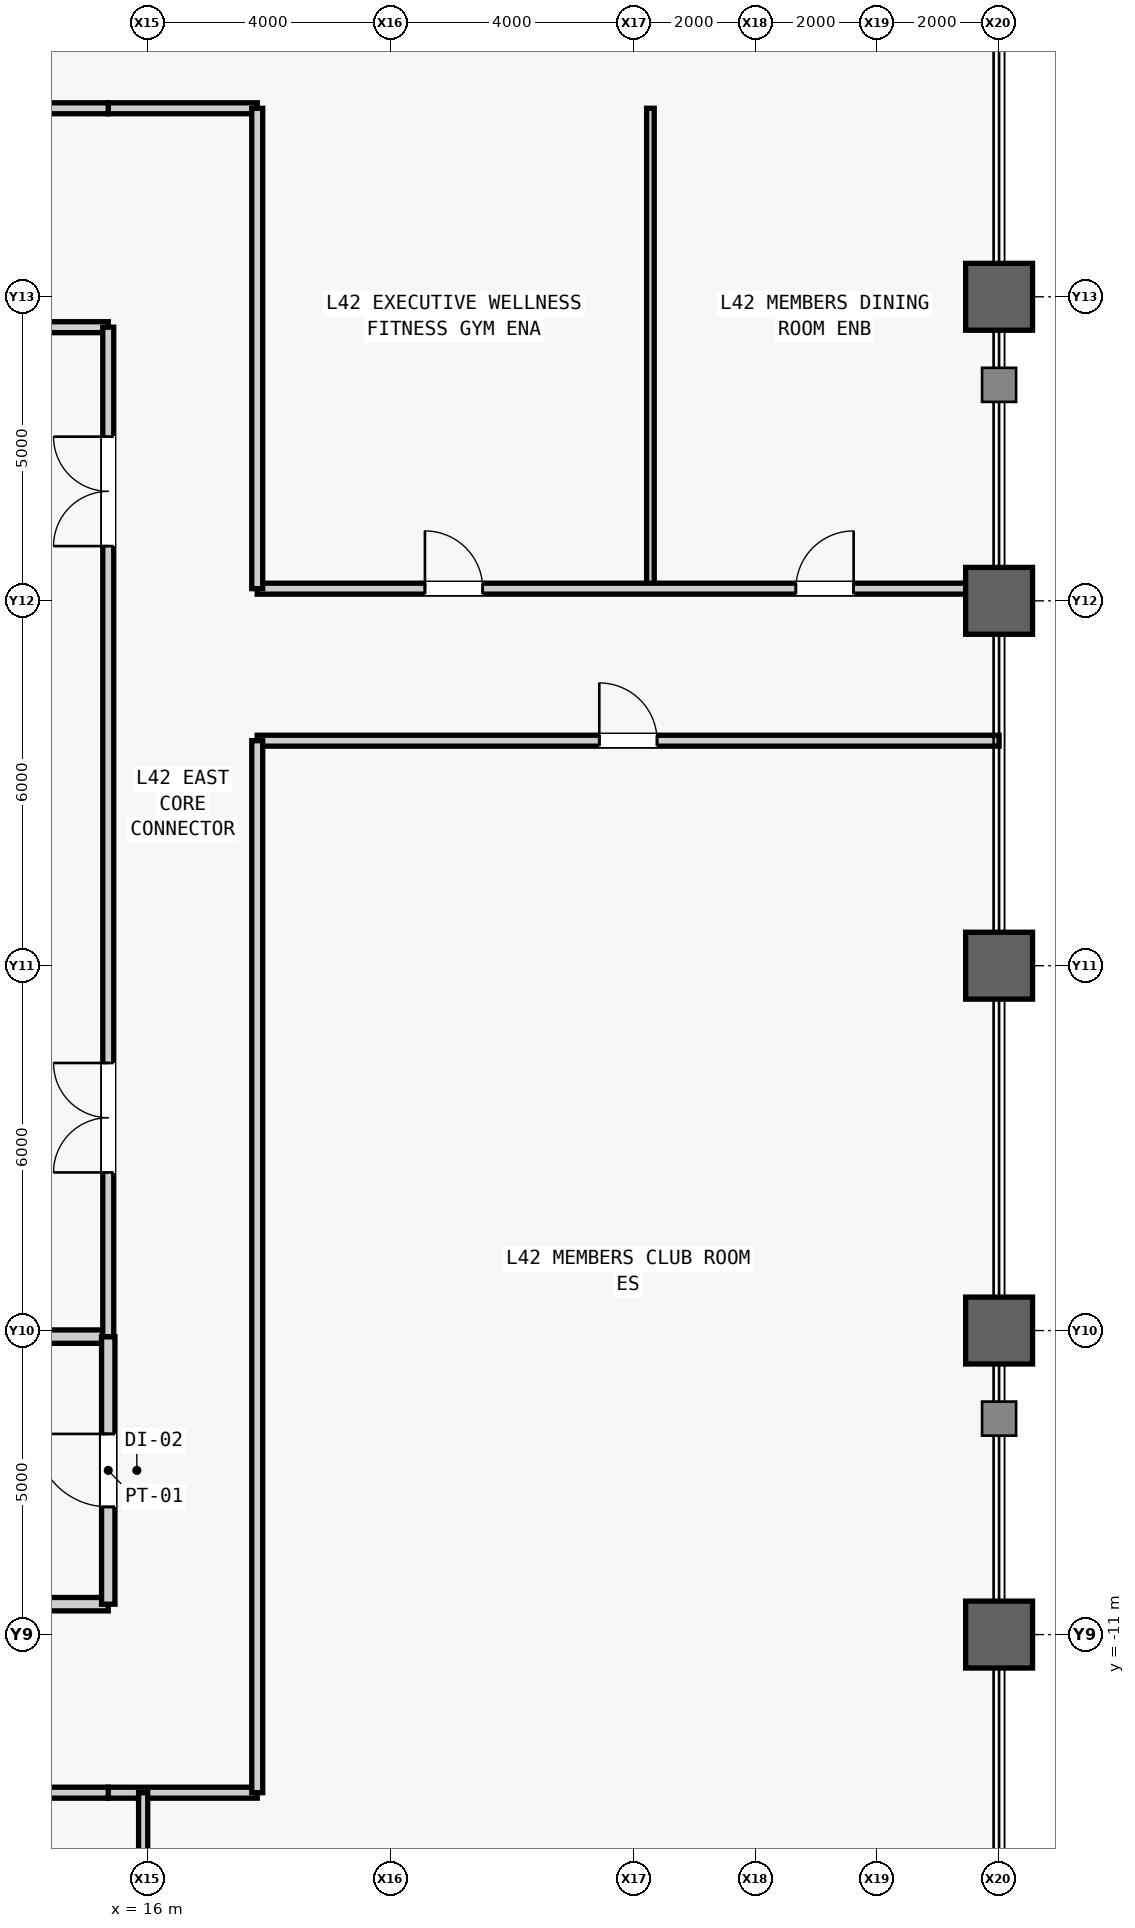
"""IFC4 building model, lengths in metres.
Left out: names, types, materials, properties, quantities, classifications, styles, units other than length and angle.
Written with IfcOpenShell. Run it as: python <this file> out.ifc"""

import sys

from ifc_helpers import new_model, si_unit, direction, frame, frame_2d, origin, origin_2d, place, context, subcontext, project, spatial, rectangle, hollow_rectangle, extrude, source, transform, mapped, element, fill, save


model = new_model("IFC4")
c1 = context("Model", 3, precision=1e-05, world=origin(), true_north=direction((0.0, 1.0)))
c2 = subcontext(c1, "Body", "Model", "MODEL_VIEW")
j1 = project(units=[si_unit("LENGTHUNIT", "METRE"), si_unit("PLANEANGLEUNIT", "RADIAN")], contexts=[c1])
p1 = place(None, origin())
s1 = spatial("IfcSite", under=j1, at=p1, CompositionType="ELEMENT")
p2 = place(p1, origin())
s2 = spatial("IfcBuilding", under=s1, at=p2, CompositionType="ELEMENT")
p3 = place(p2, frame((0.0, 0.0, 183.1)))
s3 = spatial("IfcBuildingStorey", under=s2, at=p3, CompositionType="ELEMENT", Elevation=183.1)
m1 = source(origin(), c2, "Body", "SweptSolid", [
    extrude(hollow_rectangle(XDim=1.1, YDim=1.1, WallThickness=0.06, at=origin_2d()), origin(), (0.0, 0.0, 1.0), 4.0),
])
for number, where, z_axis, x_axis in (
    (1, (30.0, -11.0, 0.0), (0.0, 0.0, 1.0), (1.0, 0.0, 0.0)),
    (2, (30.0, -6.0, 0.0), (0.0, 0.0, 1.0), (1.0, 0.0, 0.0)),
    (3, (30.0, 0.0, 0.0), (0.0, 0.0, 1.0), (1.0, 0.0, 0.0)),
    (4, (30.0, 6.0, 0.0), (0.0, 0.0, 1.0), (1.0, 0.0, 0.0)),
    (5, (30.0, 11.0, 0.0), (0.0, 0.0, 1.0), (1.0, 0.0, 0.0)),
):
    element("IfcColumn", number, at=place(p3, frame(where, z_axis=z_axis, x_axis=x_axis)), inside=s3, PredefinedType="COLUMN", context=c2, shape_type="MappedRepresentation", body=[
        mapped(m1, transform((0.0, 0.0, 0.0), scale=1.0)),
    ])
m2 = source(origin(), c2, "Body", "SweptSolid", [
    extrude(rectangle(XDim=4.05, YDim=0.22, at=frame_2d((2.025, 0.0))), origin(), (0.0, 0.0, 1.0), 3.78),
])
p4 = place(p3, frame((11.3, -10.5, 0.0), z_axis=(0.0, 0.0, 1.0), x_axis=(1.0, 0.0, 0.0)))
e6 = element("IfcWall", 6, at=p4, inside=s3, PredefinedType="PARTITIONING", context=c2, shape_type="MappedRepresentation", body=[
    mapped(m2, transform((0.0, 0.0, 0.0), scale=1.0)),
])
m3 = source(origin(), c2, "Body", "SweptSolid", [
    extrude(rectangle(XDim=4.05, YDim=0.22, at=frame_2d((2.025, 0.0))), origin(), (0.0, 0.0, 1.0), 3.007),
])
p5 = place(p3, frame((11.3, -6.1, 0.0), z_axis=(0.0, 0.0, 1.0), x_axis=(1.0, 0.0, 0.0)))
e7 = element("IfcWall", 7, at=p5, inside=s3, PredefinedType="PARTITIONING", context=c2, shape_type="MappedRepresentation", body=[
    mapped(m3, transform((0.0, 0.0, 0.0), scale=1.0)),
])
m4 = source(origin(), c2, "Body", "SweptSolid", [
    extrude(rectangle(XDim=4.4, YDim=0.22, at=frame_2d((2.2, 0.0))), origin(), (0.0, 0.0, 1.0), 3.78),
])
p6 = place(p3, frame((15.35, -10.5, 0.0), z_axis=(0.0, 0.0, 1.0), x_axis=(0.0, 1.0, 0.0)))
e8 = element("IfcWall", 8, at=p6, inside=s3, PredefinedType="PARTITIONING", context=c2, shape_type="MappedRepresentation", body=[
    mapped(m4, transform((0.0, 0.0, 0.0), scale=1.0)),
])
m5 = source(origin(), c2, "Body", "SweptSolid", [
    extrude(rectangle(XDim=1.2, YDim=2.2, at=frame_2d((0.6, 1.1))), frame((0.0, 0.12, 0.0), z_axis=(0.0, -1.0, 0.0), x_axis=(1.0, 0.0, 0.0)), (0.0, 0.0, 1.0), 0.24),
])
p7 = place(p6, frame((1.6, 0.0, 0.0)))
e9 = element("IfcOpeningElement", 9, at=p7, cuts=e8, PredefinedType="OPENING", context=c2, shape_type="MappedRepresentation", body=[
    mapped(m5, transform((0.0, 0.0, 0.0), scale=1.0)),
])
m6 = source(origin(), c2, "Body", "SweptSolid", [
    extrude(rectangle(XDim=4.05, YDim=0.18, at=frame_2d((2.025, 0.0))), origin(), (0.0, 0.0, 1.0), 3.78),
])
p8 = place(p3, frame((11.3, 10.5, 0.0), z_axis=(0.0, 0.0, 1.0), x_axis=(1.0, 0.0, 0.0)))
e10 = element("IfcWall", 10, at=p8, inside=s3, PredefinedType="PARTITIONING", context=c2, shape_type="MappedRepresentation", body=[
    mapped(m6, transform((0.0, 0.0, 0.0), scale=1.0)),
])
m7 = source(origin(), c2, "Body", "SweptSolid", [
    extrude(rectangle(XDim=16.6, YDim=0.18, at=frame_2d((8.3, 0.0))), origin(), (0.0, 0.0, 1.0), 3.78),
])
p9 = place(p3, frame((15.35, -6.1, 0.0), z_axis=(0.0, 0.0, 1.0), x_axis=(0.0, 1.0, 0.0)))
e11 = element("IfcWall", 11, at=p9, inside=s3, PredefinedType="PARTITIONING", context=c2, shape_type="MappedRepresentation", body=[
    mapped(m7, transform((0.0, 0.0, 0.0), scale=1.0)),
])
m8 = source(origin(), c2, "Body", "SweptSolid", [
    extrude(rectangle(XDim=1.8, YDim=2.25, at=frame_2d((0.9, 1.125))), frame((0.0, 0.1, 0.0), z_axis=(0.0, -1.0, 0.0), x_axis=(1.0, 0.0, 0.0)), (0.0, 0.0, 1.0), 0.2),
])
p10 = place(p9, frame((2.7, 0.0, 0.0)))
e12 = element("IfcOpeningElement", 12, at=p10, cuts=e11, PredefinedType="OPENING", context=c2, shape_type="MappedRepresentation", body=[
    mapped(m8, transform((0.0, 0.0, 0.0), scale=1.0)),
])
p11 = place(p9, frame((13.0, 0.0, 0.0)))
e13 = element("IfcOpeningElement", 13, at=p11, cuts=e11, PredefinedType="OPENING", context=c2, shape_type="MappedRepresentation", body=[
    mapped(m8, transform((0.0, 0.0, 0.0), scale=1.0)),
])
m9 = source(origin(), c2, "Body", "SweptSolid", [
    extrude(rectangle(XDim=2.45, YDim=0.18, at=frame_2d((1.225, 0.0))), origin(), (0.0, 0.0, 1.0), 3.78),
])
for number, where, z_axis, x_axis in (
    (14, (15.35, -13.6, 0.0), (0.0, 0.0, 1.0), (1.0, 0.0, 0.0)),
    (15, (15.35, 14.1, 0.0), (0.0, 0.0, 1.0), (1.0, 0.0, 0.0)),
):
    element("IfcWall", number, at=place(p3, frame(where, z_axis=z_axis, x_axis=x_axis)), inside=s3, PredefinedType="PARTITIONING", context=c2, shape_type="MappedRepresentation", body=[
        mapped(m9, transform((0.0, 0.0, 0.0), scale=1.0)),
    ])
m10 = source(origin(), c2, "Body", "SweptSolid", [
    extrude(rectangle(XDim=16.4, YDim=0.15, at=frame_2d((8.2, 0.0))), origin(), (0.0, 0.0, 1.0), 3.78),
])
p12 = place(p3, frame((15.924, -30.0, 0.0), z_axis=(0.0, 0.0, 1.0), x_axis=(0.0, 1.0, 0.0)))
e16 = element("IfcWall", 16, at=p12, inside=s3, PredefinedType="PARTITIONING", context=c2, shape_type="MappedRepresentation", body=[
    mapped(m10, transform((0.0, 0.0, 0.0), scale=1.0)),
])
m11 = source(origin(), c2, "Body", "SweptSolid", [
    extrude(rectangle(XDim=0.95, YDim=2.15, at=frame_2d((0.475, 1.075))), frame((0.0, 0.085, 0.0), z_axis=(0.0, -1.0, 0.0), x_axis=(1.0, 0.0, 0.0)), (0.0, 0.0, 1.0), 0.17),
])
p13 = place(p12, frame((11.825, 0.0, 0.0)))
e17 = element("IfcOpeningElement", 17, at=p13, cuts=e16, PredefinedType="OPENING", context=c2, shape_type="MappedRepresentation", body=[
    mapped(m11, transform((0.0, 0.0, 0.0), scale=1.0)),
])
m12 = source(origin(), c2, "Body", "SweptSolid", [
    extrude(rectangle(XDim=15.05, YDim=0.18, at=frame_2d((7.525, 0.0))), origin(), (0.0, 0.0, 1.0), 3.78),
])
p14 = place(p3, frame((0.3, -13.6, 0.0), z_axis=(0.0, 0.0, 1.0), x_axis=(1.0, 0.0, 0.0)))
e18 = element("IfcWall", 18, at=p14, inside=s3, PredefinedType="PARTITIONING", context=c2, shape_type="MappedRepresentation", body=[
    mapped(m12, transform((0.0, 0.0, 0.0), scale=1.0)),
])
m13 = source(origin(), c2, "Body", "SweptSolid", [
    extrude(rectangle(XDim=6.05, YDim=0.18, at=frame_2d((3.025, 0.0))), origin(), (0.0, 0.0, 1.0), 3.78),
])
p15 = place(p3, frame((9.3, 14.1, 0.0), z_axis=(0.0, 0.0, 1.0), x_axis=(1.0, 0.0, 0.0)))
e19 = element("IfcWall", 19, at=p15, inside=s3, PredefinedType="PARTITIONING", context=c2, shape_type="MappedRepresentation", body=[
    mapped(m13, transform((0.0, 0.0, 0.0), scale=1.0)),
])
m14 = source(origin(), c2, "Body", "SweptSolid", [
    extrude(rectangle(XDim=12.2, YDim=0.18, at=frame_2d((6.1, 0.0))), origin(), (0.0, 0.0, 1.0), 3.78),
])
p16 = place(p3, frame((17.8, 3.7, 0.0), z_axis=(0.0, 0.0, 1.0), x_axis=(1.0, 0.0, 0.0)))
e20 = element("IfcWall", 20, at=p16, inside=s3, PredefinedType="PARTITIONING", context=c2, shape_type="MappedRepresentation", body=[
    mapped(m14, transform((0.0, 0.0, 0.0), scale=1.0)),
])
m15 = source(origin(), c2, "Body", "SweptSolid", [
    extrude(rectangle(XDim=0.95, YDim=2.15, at=frame_2d((0.475, 1.075))), frame((0.0, 0.1, 0.0), z_axis=(0.0, -1.0, 0.0), x_axis=(1.0, 0.0, 0.0)), (0.0, 0.0, 1.0), 0.2),
])
p17 = place(p16, frame((5.625, 0.0, 0.0)))
e21 = element("IfcOpeningElement", 21, at=p17, cuts=e20, PredefinedType="OPENING", context=c2, shape_type="MappedRepresentation", body=[
    mapped(m15, transform((0.0, 0.0, 0.0), scale=1.0)),
])
m16 = source(origin(), c2, "Body", "SweptSolid", [
    extrude(rectangle(XDim=17.3, YDim=0.18, at=frame_2d((8.65, 0.0))), origin(), (0.0, 0.0, 1.0), 3.78),
])
p18 = place(p3, frame((17.8, -13.6, 0.0), z_axis=(0.0, 0.0, 1.0), x_axis=(0.0, 1.0, 0.0)))
e22 = element("IfcWall", 22, at=p18, inside=s3, PredefinedType="PARTITIONING", context=c2, shape_type="MappedRepresentation", body=[
    mapped(m16, transform((0.0, 0.0, 0.0), scale=1.0)),
])
m17 = source(origin(), c2, "Body", "SweptSolid", [
    extrude(rectangle(XDim=7.9, YDim=0.125, at=frame_2d((3.95, 0.0))), origin(), (0.0, 0.0, 1.0), 3.78),
])
p19 = place(p3, frame((24.266, 6.2, 0.0), z_axis=(0.0, 0.0, 1.0), x_axis=(0.0, 1.0, 0.0)))
e23 = element("IfcWall", 23, at=p19, inside=s3, PredefinedType="PARTITIONING", context=c2, shape_type="MappedRepresentation", body=[
    mapped(m17, transform((0.0, 0.0, 0.0), scale=1.0)),
])
m18 = source(origin(), c2, "Body", "SweptSolid", [
    extrude(rectangle(XDim=12.2, YDim=0.18, at=frame_2d((6.1, 0.0))), origin(), (0.0, 0.0, 1.0), 3.007),
])
p20 = place(p3, frame((17.8, 6.2, 0.0), z_axis=(0.0, 0.0, 1.0), x_axis=(1.0, 0.0, 0.0)))
e24 = element("IfcWall", 24, at=p20, inside=s3, PredefinedType="PARTITIONING", context=c2, shape_type="MappedRepresentation", body=[
    mapped(m18, transform((0.0, 0.0, 0.0), scale=1.0)),
])
p21 = place(p20, frame((2.758, 0.0, 0.0)))
e25 = element("IfcOpeningElement", 25, at=p21, cuts=e24, PredefinedType="OPENING", context=c2, shape_type="MappedRepresentation", body=[
    mapped(m15, transform((0.0, 0.0, 0.0), scale=1.0)),
])
p22 = place(p20, frame((8.858, 0.0, 0.0)))
e26 = element("IfcOpeningElement", 26, at=p22, cuts=e24, PredefinedType="OPENING", context=c2, shape_type="MappedRepresentation", body=[
    mapped(m15, transform((0.0, 0.0, 0.0), scale=1.0)),
])
m19 = source(origin(), c2, "Body", "SweptSolid", [
    extrude(rectangle(XDim=7.9, YDim=0.18, at=frame_2d((3.95, 0.0))), origin(), (0.0, 0.0, 1.0), 3.78),
])
p23 = place(p3, frame((17.8, 6.2, 0.0), z_axis=(0.0, 0.0, 1.0), x_axis=(0.0, 1.0, 0.0)))
e27 = element("IfcWall", 27, at=p23, inside=s3, PredefinedType="PARTITIONING", context=c2, shape_type="MappedRepresentation", body=[
    mapped(m19, transform((0.0, 0.0, 0.0), scale=1.0)),
])
m20 = source(origin(), c2, "Body", "SweptSolid", [
    extrude(rectangle(XDim=1.2, YDim=2.2, at=frame_2d((0.6, 1.1))), frame((0.0, 0.025, 0.0), z_axis=(0.0, -1.0, 0.0), x_axis=(1.0, 0.0, 0.0)), (0.0, 0.0, 1.0), 0.05),
])
p24 = place(p7, origin())
e28 = element("IfcDoor", 28, at=p24, inside=s3, OperationType="SINGLE_SWING_RIGHT", PredefinedType="DOOR", context=c2, shape_type="MappedRepresentation", body=[
    mapped(m20, transform((0.0, 0.0, 0.0), scale=1.0)),
])
fill(e9, e28)
m21 = source(origin(), c2, "Body", "SweptSolid", [
    extrude(rectangle(XDim=1.8, YDim=2.25, at=frame_2d((0.9, 1.125))), frame((0.0, 0.025, 0.0), z_axis=(0.0, -1.0, 0.0), x_axis=(1.0, 0.0, 0.0)), (0.0, 0.0, 1.0), 0.05),
])
p25 = place(p10, origin())
e29 = element("IfcDoor", 29, at=p25, inside=s3, OperationType="SINGLE_SWING_RIGHT", PredefinedType="DOOR", context=c2, shape_type="MappedRepresentation", body=[
    mapped(m21, transform((0.0, 0.0, 0.0), scale=1.0)),
])
fill(e12, e29)
p26 = place(p11, origin())
e30 = element("IfcDoor", 30, at=p26, inside=s3, OperationType="SINGLE_SWING_LEFT", PredefinedType="DOOR", context=c2, shape_type="MappedRepresentation", body=[
    mapped(m21, transform((0.0, 0.0, 0.0), scale=1.0)),
])
fill(e13, e30)
m22 = source(origin(), c2, "Body", "SweptSolid", [
    extrude(rectangle(XDim=0.95, YDim=2.15, at=frame_2d((0.475, 1.075))), frame((0.0, 0.025, 0.0), z_axis=(0.0, -1.0, 0.0), x_axis=(1.0, 0.0, 0.0)), (0.0, 0.0, 1.0), 0.05),
])
p27 = place(p17, origin())
e31 = element("IfcDoor", 31, at=p27, inside=s3, OperationType="SINGLE_SWING_LEFT", PredefinedType="DOOR", context=c2, shape_type="MappedRepresentation", body=[
    mapped(m22, transform((0.0, 0.0, 0.0), scale=1.0)),
])
fill(e21, e31)
p28 = place(p21, origin())
e32 = element("IfcDoor", 32, at=p28, inside=s3, OperationType="SINGLE_SWING_LEFT", PredefinedType="DOOR", context=c2, shape_type="MappedRepresentation", body=[
    mapped(m22, transform((0.0, 0.0, 0.0), scale=1.0)),
])
fill(e25, e32)
p29 = place(p22, origin())
e33 = element("IfcDoor", 33, at=p29, inside=s3, OperationType="SINGLE_SWING_RIGHT", PredefinedType="DOOR", context=c2, shape_type="MappedRepresentation", body=[
    mapped(m22, transform((0.0, 0.0, 0.0), scale=1.0)),
])
fill(e26, e33)
save(model, sys.argv[1])
